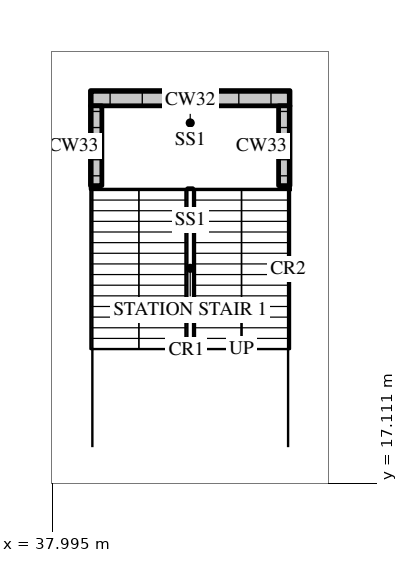
"""IFC4 building model, lengths in metres.
Left out: names, types, materials, properties, quantities, classifications, styles, units other than length and angle.
Written with IfcOpenShell. Run it as: python <this file> out.ifc"""

import sys

from ifc_helpers import new_model, si_unit, direction, frame, frame_2d, origin, place, context, subcontext, project, spatial, rectangle, extrude, element, save


model = new_model("IFC4")
c1 = context("Model", 3, precision=1e-05, world=origin(), true_north=direction((0.0, 1.0)))
c2 = subcontext(c1, "Body", "Model", "MODEL_VIEW")
j1 = project(units=[si_unit("LENGTHUNIT", "METRE"), si_unit("PLANEANGLEUNIT", "RADIAN")], contexts=[c1])
p1 = place(None, origin())
s1 = spatial("IfcSite", under=j1, at=p1, CompositionType="ELEMENT")
p2 = place(p1, origin())
s2 = spatial("IfcBuilding", under=s1, at=p2, CompositionType="ELEMENT")
p3 = place(p2, frame((0.0, 0.0, -6.0)))
s3 = spatial("IfcBuildingStorey", under=s2, at=p3, CompositionType="ELEMENT", Elevation=-6.0)
p4 = place(p3, frame((44.25, 27.25, 0.0), z_axis=(0.0, 0.0, 1.0), x_axis=(-1.0, 0.0, 0.0)))
e1 = element("IfcWall", 1, at=p4, inside=s3, PredefinedType="SOLIDWALL", context=c2, shape_type="SweptSolid", body=[
    extrude(rectangle(XDim=5.25, YDim=0.4, at=frame_2d((2.625, 0.0))), origin(), (0.0, 0.0, 1.0), 2.8),
])
for number, where, z_axis, x_axis in (
    (2, (44.1, 24.95, 0.0), (0.0, 0.0, 1.0), (0.0, 1.0, 0.0)),
    (3, (39.15, 24.95, 0.0), (0.0, 0.0, 1.0), (0.0, 1.0, 0.0)),
):
    element("IfcWall", number, at=place(p3, frame(where, z_axis=z_axis, x_axis=x_axis)), inside=s3, PredefinedType="SOLIDWALL", context=c2, shape_type="SweptSolid", body=[
        extrude(rectangle(XDim=2.1, YDim=0.3, at=frame_2d((1.05, 0.0))), origin(), (0.0, 0.0, 1.0), 2.8),
    ])
save(model, sys.argv[1])
